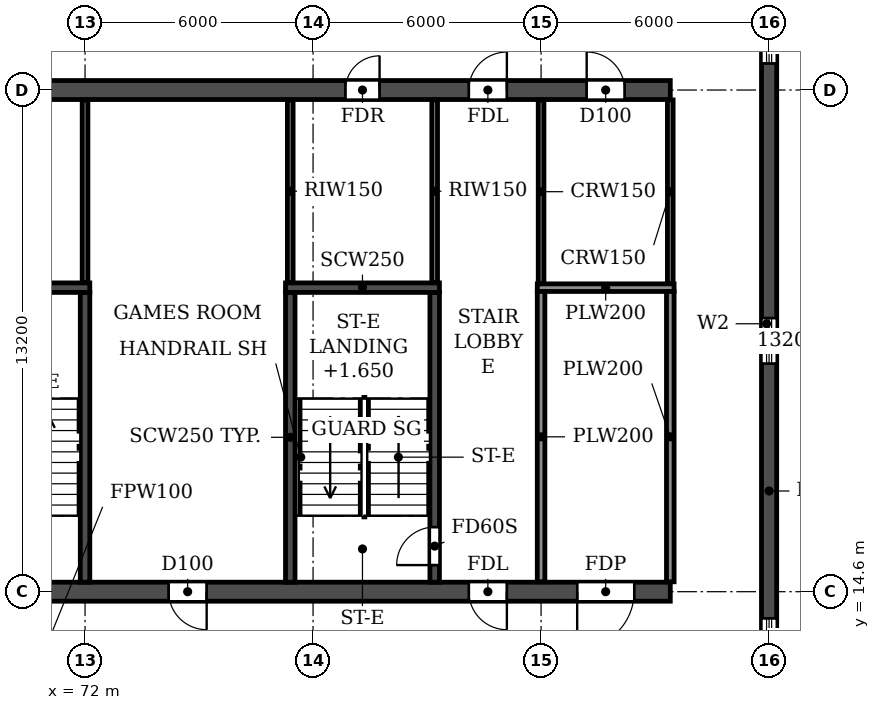
"""IFC4 building model, lengths in metres.
Left out: names, types, materials, properties, quantities, classifications, styles, units other than length and angle.
Written with IfcOpenShell. Run it as: python <this file> out.ifc"""

import sys

from ifc_helpers import new_model, si_unit, direction, frame, frame_2d, origin, place, context, subcontext, project, spatial, rectangle, extrude, element, fill, save


model = new_model("IFC4")
c1 = context("Model", 3, precision=1e-05, world=origin(), true_north=direction((0.0, 1.0)))
c2 = subcontext(c1, "Body", "Model", "MODEL_VIEW")
j1 = project(units=[si_unit("LENGTHUNIT", "METRE"), si_unit("PLANEANGLEUNIT", "RADIAN")], contexts=[c1])
p1 = place(None, origin())
s1 = spatial("IfcSite", under=j1, at=p1, CompositionType="ELEMENT")
p2 = place(p1, origin())
s2 = spatial("IfcBuilding", under=s1, at=p2, CompositionType="ELEMENT")
p3 = place(p2, frame((0.0, 0.0, 112.5)))
s3 = spatial("IfcBuildingStorey", under=s2, at=p3, CompositionType="ELEMENT", Elevation=112.5)
p4 = place(p3, frame((90.0, 4.683, 0.0), z_axis=(0.0, 0.0, 1.0), x_axis=(0.0, 1.0, 0.0)))
e1 = element("IfcWall", 1, at=p4, inside=s3, PredefinedType="SHEAR", context=c2, shape_type="SweptSolid", body=[
    extrude(rectangle(XDim=34.234, YDim=0.4, at=frame_2d((17.117, 0.0))), origin(), (0.0, 0.0, 1.0), 2.95),
])
p5 = place(p4, frame((15.917, 0.0, 0.9)))
e2 = element("IfcOpeningElement", 2, at=p5, cuts=e1, PredefinedType="OPENING", context=c2, shape_type="SweptSolid", body=[
    extrude(rectangle(XDim=1.2, YDim=1.5, at=frame_2d((0.6, 0.75))), frame((0.0, 0.21, 0.0), z_axis=(0.0, -1.0, 0.0), x_axis=(1.0, 0.0, 0.0)), (0.0, 0.0, 1.0), 0.42),
])
p6 = place(p4, frame((23.817, 0.0, 0.9)))
e3 = element("IfcOpeningElement", 3, at=p6, cuts=e1, PredefinedType="OPENING", context=c2, shape_type="SweptSolid", body=[
    extrude(rectangle(XDim=1.2, YDim=1.5, at=frame_2d((0.6, 0.75))), frame((0.0, 0.21, 0.0), z_axis=(0.0, -1.0, 0.0), x_axis=(1.0, 0.0, 0.0)), (0.0, 0.0, 1.0), 0.42),
])
p7 = place(p4, frame((8.017, 0.0, 0.9)))
e4 = element("IfcOpeningElement", 4, at=p7, cuts=e1, PredefinedType="OPENING", context=c2, shape_type="SweptSolid", body=[
    extrude(rectangle(XDim=1.2, YDim=1.5, at=frame_2d((0.6, 0.75))), frame((0.0, 0.21, 0.0), z_axis=(0.0, -1.0, 0.0), x_axis=(1.0, 0.0, 0.0)), (0.0, 0.0, 1.0), 0.42),
])
p8 = place(p4, frame((28.894, 0.0, 0.6)))
e5 = element("IfcOpeningElement", 5, at=p8, cuts=e1, PredefinedType="OPENING", context=c2, shape_type="SweptSolid", body=[
    extrude(rectangle(XDim=2.2, YDim=1.8, at=frame_2d((1.1, 0.9))), frame((0.0, 0.21, 0.0), z_axis=(0.0, -1.0, 0.0), x_axis=(1.0, 0.0, 0.0)), (0.0, 0.0, 1.0), 0.42),
])
p9 = place(p4, frame((2.541, 0.0, 0.6)))
e6 = element("IfcOpeningElement", 6, at=p9, cuts=e1, PredefinedType="OPENING", context=c2, shape_type="SweptSolid", body=[
    extrude(rectangle(XDim=2.2, YDim=1.8, at=frame_2d((1.1, 0.9))), frame((0.0, 0.21, 0.0), z_axis=(0.0, -1.0, 0.0), x_axis=(1.0, 0.0, 0.0)), (0.0, 0.0, 1.0), 0.42),
])
p10 = place(p3, frame((14.6, 14.6, 0.0), z_axis=(0.0, 0.0, 1.0), x_axis=(1.0, 0.0, 0.0)))
e7 = element("IfcWall", 7, at=p10, inside=s3, PredefinedType="SOLIDWALL", context=c2, shape_type="SweptSolid", body=[
    extrude(rectangle(XDim=72.8, YDim=0.5, at=frame_2d((36.4, 0.0))), origin(), (0.0, 0.0, 1.0), 2.95),
])
p11 = place(p10, frame((1.2, 0.0, 0.0)))
e8 = element("IfcOpeningElement", 8, at=p11, cuts=e7, PredefinedType="OPENING", context=c2, shape_type="SweptSolid", body=[
    extrude(rectangle(XDim=1.0, YDim=2.1, at=frame_2d((0.5, 1.05))), frame((0.0, 0.26, 0.0), z_axis=(0.0, -1.0, 0.0), x_axis=(1.0, 0.0, 0.0)), (0.0, 0.0, 1.0), 0.52),
])
p12 = place(p10, frame((4.3, 0.0, 0.0)))
e9 = element("IfcOpeningElement", 9, at=p12, cuts=e7, PredefinedType="OPENING", context=c2, shape_type="SweptSolid", body=[
    extrude(rectangle(XDim=1.0, YDim=2.1, at=frame_2d((0.5, 1.05))), frame((0.0, 0.26, 0.0), z_axis=(0.0, -1.0, 0.0), x_axis=(1.0, 0.0, 0.0)), (0.0, 0.0, 1.0), 0.52),
])
p13 = place(p10, frame((12.2, 0.0, 0.0)))
e10 = element("IfcOpeningElement", 10, at=p13, cuts=e7, PredefinedType="OPENING", context=c2, shape_type="SweptSolid", body=[
    extrude(rectangle(XDim=1.0, YDim=2.1, at=frame_2d((0.5, 1.05))), frame((0.0, 0.26, 0.0), z_axis=(0.0, -1.0, 0.0), x_axis=(1.0, 0.0, 0.0)), (0.0, 0.0, 1.0), 0.52),
])
p14 = place(p10, frame((16.8, 0.0, 0.0)))
e11 = element("IfcOpeningElement", 11, at=p14, cuts=e7, PredefinedType="OPENING", context=c2, shape_type="SweptSolid", body=[
    extrude(rectangle(XDim=1.0, YDim=2.1, at=frame_2d((0.5, 1.05))), frame((0.0, 0.26, 0.0), z_axis=(0.0, -1.0, 0.0), x_axis=(1.0, 0.0, 0.0)), (0.0, 0.0, 1.0), 0.52),
])
p15 = place(p10, frame((28.1, 0.0, 0.0)))
e12 = element("IfcOpeningElement", 12, at=p15, cuts=e7, PredefinedType="OPENING", context=c2, shape_type="SweptSolid", body=[
    extrude(rectangle(XDim=1.0, YDim=2.1, at=frame_2d((0.5, 1.05))), frame((0.0, 0.26, 0.0), z_axis=(0.0, -1.0, 0.0), x_axis=(1.0, 0.0, 0.0)), (0.0, 0.0, 1.0), 0.52),
])
p16 = place(p10, frame((32.0, 0.0, 0.0)))
e13 = element("IfcOpeningElement", 13, at=p16, cuts=e7, PredefinedType="OPENING", context=c2, shape_type="SweptSolid", body=[
    extrude(rectangle(XDim=1.0, YDim=2.1, at=frame_2d((0.5, 1.05))), frame((0.0, 0.26, 0.0), z_axis=(0.0, -1.0, 0.0), x_axis=(1.0, 0.0, 0.0)), (0.0, 0.0, 1.0), 0.52),
])
p17 = place(p10, frame((35.9, 0.0, 0.0)))
e14 = element("IfcOpeningElement", 14, at=p17, cuts=e7, PredefinedType="OPENING", context=c2, shape_type="SweptSolid", body=[
    extrude(rectangle(XDim=1.0, YDim=2.1, at=frame_2d((0.5, 1.05))), frame((0.0, 0.26, 0.0), z_axis=(0.0, -1.0, 0.0), x_axis=(1.0, 0.0, 0.0)), (0.0, 0.0, 1.0), 0.52),
])
p18 = place(p10, frame((39.8, 0.0, 0.0)))
e15 = element("IfcOpeningElement", 15, at=p18, cuts=e7, PredefinedType="OPENING", context=c2, shape_type="SweptSolid", body=[
    extrude(rectangle(XDim=1.0, YDim=2.1, at=frame_2d((0.5, 1.05))), frame((0.0, 0.26, 0.0), z_axis=(0.0, -1.0, 0.0), x_axis=(1.0, 0.0, 0.0)), (0.0, 0.0, 1.0), 0.52),
])
p19 = place(p10, frame((43.7, 0.0, 0.0)))
e16 = element("IfcOpeningElement", 16, at=p19, cuts=e7, PredefinedType="OPENING", context=c2, shape_type="SweptSolid", body=[
    extrude(rectangle(XDim=1.0, YDim=2.1, at=frame_2d((0.5, 1.05))), frame((0.0, 0.26, 0.0), z_axis=(0.0, -1.0, 0.0), x_axis=(1.0, 0.0, 0.0)), (0.0, 0.0, 1.0), 0.52),
])
p20 = place(p10, frame((55.0, 0.0, 0.0)))
e17 = element("IfcOpeningElement", 17, at=p20, cuts=e7, PredefinedType="OPENING", context=c2, shape_type="SweptSolid", body=[
    extrude(rectangle(XDim=1.0, YDim=2.1, at=frame_2d((0.5, 1.05))), frame((0.0, 0.26, 0.0), z_axis=(0.0, -1.0, 0.0), x_axis=(1.0, 0.0, 0.0)), (0.0, 0.0, 1.0), 0.52),
])
p21 = place(p10, frame((59.6, 0.0, 0.0)))
e18 = element("IfcOpeningElement", 18, at=p21, cuts=e7, PredefinedType="OPENING", context=c2, shape_type="SweptSolid", body=[
    extrude(rectangle(XDim=1.0, YDim=2.1, at=frame_2d((0.5, 1.05))), frame((0.0, 0.26, 0.0), z_axis=(0.0, -1.0, 0.0), x_axis=(1.0, 0.0, 0.0)), (0.0, 0.0, 1.0), 0.52),
])
p22 = place(p10, frame((67.5, 0.0, 0.0)))
e19 = element("IfcOpeningElement", 19, at=p22, cuts=e7, PredefinedType="OPENING", context=c2, shape_type="SweptSolid", body=[
    extrude(rectangle(XDim=1.0, YDim=2.1, at=frame_2d((0.5, 1.05))), frame((0.0, 0.26, 0.0), z_axis=(0.0, -1.0, 0.0), x_axis=(1.0, 0.0, 0.0)), (0.0, 0.0, 1.0), 0.52),
])
p23 = place(p10, frame((70.35, 0.0, 0.0)))
e20 = element("IfcOpeningElement", 20, at=p23, cuts=e7, PredefinedType="OPENING", context=c2, shape_type="SweptSolid", body=[
    extrude(rectangle(XDim=1.5, YDim=2.1, at=frame_2d((0.75, 1.05))), frame((0.0, 0.26, 0.0), z_axis=(0.0, -1.0, 0.0), x_axis=(1.0, 0.0, 0.0)), (0.0, 0.0, 1.0), 0.52),
])
p24 = place(p3, frame((14.6, 27.8, 0.0), z_axis=(0.0, 0.0, 1.0), x_axis=(1.0, 0.0, 0.0)))
e21 = element("IfcWall", 21, at=p24, inside=s3, PredefinedType="SOLIDWALL", context=c2, shape_type="SweptSolid", body=[
    extrude(rectangle(XDim=72.8, YDim=0.5, at=frame_2d((36.4, 0.0))), origin(), (0.0, 0.0, 1.0), 2.95),
])
p25 = place(p24, frame((1.2, 0.0, 0.0)))
e22 = element("IfcOpeningElement", 22, at=p25, cuts=e21, PredefinedType="OPENING", context=c2, shape_type="SweptSolid", body=[
    extrude(rectangle(XDim=1.0, YDim=2.1, at=frame_2d((0.5, 1.05))), frame((0.0, 0.26, 0.0), z_axis=(0.0, -1.0, 0.0), x_axis=(1.0, 0.0, 0.0)), (0.0, 0.0, 1.0), 0.52),
])
p26 = place(p24, frame((4.3, 0.0, 0.0)))
e23 = element("IfcOpeningElement", 23, at=p26, cuts=e21, PredefinedType="OPENING", context=c2, shape_type="SweptSolid", body=[
    extrude(rectangle(XDim=1.0, YDim=2.1, at=frame_2d((0.5, 1.05))), frame((0.0, 0.26, 0.0), z_axis=(0.0, -1.0, 0.0), x_axis=(1.0, 0.0, 0.0)), (0.0, 0.0, 1.0), 0.52),
])
p27 = place(p24, frame((7.65, 0.0, 0.0)))
e24 = element("IfcOpeningElement", 24, at=p27, cuts=e21, PredefinedType="OPENING", context=c2, shape_type="SweptSolid", body=[
    extrude(rectangle(XDim=0.9, YDim=2.1, at=frame_2d((0.45, 1.05))), frame((0.0, 0.26, 0.0), z_axis=(0.0, -1.0, 0.0), x_axis=(1.0, 0.0, 0.0)), (0.0, 0.0, 1.0), 0.52),
])
p28 = place(p24, frame((16.85, 0.0, 0.0)))
e25 = element("IfcOpeningElement", 25, at=p28, cuts=e21, PredefinedType="OPENING", context=c2, shape_type="SweptSolid", body=[
    extrude(rectangle(XDim=0.9, YDim=2.1, at=frame_2d((0.45, 1.05))), frame((0.0, 0.26, 0.0), z_axis=(0.0, -1.0, 0.0), x_axis=(1.0, 0.0, 0.0)), (0.0, 0.0, 1.0), 0.52),
])
p29 = place(p24, frame((20.0, 0.0, 0.0)))
e26 = element("IfcOpeningElement", 26, at=p29, cuts=e21, PredefinedType="OPENING", context=c2, shape_type="SweptSolid", body=[
    extrude(rectangle(XDim=1.0, YDim=2.1, at=frame_2d((0.5, 1.05))), frame((0.0, 0.26, 0.0), z_axis=(0.0, -1.0, 0.0), x_axis=(1.0, 0.0, 0.0)), (0.0, 0.0, 1.0), 0.52),
])
p30 = place(p24, frame((25.2, 0.0, 0.0)))
e27 = element("IfcOpeningElement", 27, at=p30, cuts=e21, PredefinedType="OPENING", context=c2, shape_type="SweptSolid", body=[
    extrude(rectangle(XDim=1.0, YDim=2.1, at=frame_2d((0.5, 1.05))), frame((0.0, 0.26, 0.0), z_axis=(0.0, -1.0, 0.0), x_axis=(1.0, 0.0, 0.0)), (0.0, 0.0, 1.0), 0.52),
])
p31 = place(p24, frame((33.0, 0.0, 0.0)))
e28 = element("IfcOpeningElement", 28, at=p31, cuts=e21, PredefinedType="OPENING", context=c2, shape_type="SweptSolid", body=[
    extrude(rectangle(XDim=1.0, YDim=2.1, at=frame_2d((0.5, 1.05))), frame((0.0, 0.26, 0.0), z_axis=(0.0, -1.0, 0.0), x_axis=(1.0, 0.0, 0.0)), (0.0, 0.0, 1.0), 0.52),
])
p32 = place(p24, frame((35.9, 0.0, 0.0)))
e29 = element("IfcOpeningElement", 29, at=p32, cuts=e21, PredefinedType="OPENING", context=c2, shape_type="SweptSolid", body=[
    extrude(rectangle(XDim=1.0, YDim=2.1, at=frame_2d((0.5, 1.05))), frame((0.0, 0.26, 0.0), z_axis=(0.0, -1.0, 0.0), x_axis=(1.0, 0.0, 0.0)), (0.0, 0.0, 1.0), 0.52),
])
p33 = place(p24, frame((38.8, 0.0, 0.0)))
e30 = element("IfcOpeningElement", 30, at=p33, cuts=e21, PredefinedType="OPENING", context=c2, shape_type="SweptSolid", body=[
    extrude(rectangle(XDim=1.0, YDim=2.1, at=frame_2d((0.5, 1.05))), frame((0.0, 0.26, 0.0), z_axis=(0.0, -1.0, 0.0), x_axis=(1.0, 0.0, 0.0)), (0.0, 0.0, 1.0), 0.52),
])
p34 = place(p24, frame((44.0, 0.0, 0.0)))
e31 = element("IfcOpeningElement", 31, at=p34, cuts=e21, PredefinedType="OPENING", context=c2, shape_type="SweptSolid", body=[
    extrude(rectangle(XDim=1.0, YDim=2.1, at=frame_2d((0.5, 1.05))), frame((0.0, 0.26, 0.0), z_axis=(0.0, -1.0, 0.0), x_axis=(1.0, 0.0, 0.0)), (0.0, 0.0, 1.0), 0.52),
])
p35 = place(p24, frame((49.2, 0.0, 0.0)))
e32 = element("IfcOpeningElement", 32, at=p35, cuts=e21, PredefinedType="OPENING", context=c2, shape_type="SweptSolid", body=[
    extrude(rectangle(XDim=1.0, YDim=2.1, at=frame_2d((0.5, 1.05))), frame((0.0, 0.26, 0.0), z_axis=(0.0, -1.0, 0.0), x_axis=(1.0, 0.0, 0.0)), (0.0, 0.0, 1.0), 0.52),
])
p36 = place(p24, frame((51.8, 0.0, 0.0)))
e33 = element("IfcOpeningElement", 33, at=p36, cuts=e21, PredefinedType="OPENING", context=c2, shape_type="SweptSolid", body=[
    extrude(rectangle(XDim=1.0, YDim=2.1, at=frame_2d((0.5, 1.05))), frame((0.0, 0.26, 0.0), z_axis=(0.0, -1.0, 0.0), x_axis=(1.0, 0.0, 0.0)), (0.0, 0.0, 1.0), 0.52),
])
p37 = place(p24, frame((55.05, 0.0, 0.0)))
e34 = element("IfcOpeningElement", 34, at=p37, cuts=e21, PredefinedType="OPENING", context=c2, shape_type="SweptSolid", body=[
    extrude(rectangle(XDim=0.9, YDim=2.1, at=frame_2d((0.45, 1.05))), frame((0.0, 0.26, 0.0), z_axis=(0.0, -1.0, 0.0), x_axis=(1.0, 0.0, 0.0)), (0.0, 0.0, 1.0), 0.52),
])
p38 = place(p24, frame((64.25, 0.0, 0.0)))
e35 = element("IfcOpeningElement", 35, at=p38, cuts=e21, PredefinedType="OPENING", context=c2, shape_type="SweptSolid", body=[
    extrude(rectangle(XDim=0.9, YDim=2.1, at=frame_2d((0.45, 1.05))), frame((0.0, 0.26, 0.0), z_axis=(0.0, -1.0, 0.0), x_axis=(1.0, 0.0, 0.0)), (0.0, 0.0, 1.0), 0.52),
])
p39 = place(p24, frame((67.5, 0.0, 0.0)))
e36 = element("IfcOpeningElement", 36, at=p39, cuts=e21, PredefinedType="OPENING", context=c2, shape_type="SweptSolid", body=[
    extrude(rectangle(XDim=1.0, YDim=2.1, at=frame_2d((0.5, 1.05))), frame((0.0, 0.26, 0.0), z_axis=(0.0, -1.0, 0.0), x_axis=(1.0, 0.0, 0.0)), (0.0, 0.0, 1.0), 0.52),
])
p40 = place(p24, frame((70.6, 0.0, 0.0)))
e37 = element("IfcOpeningElement", 37, at=p40, cuts=e21, PredefinedType="OPENING", context=c2, shape_type="SweptSolid", body=[
    extrude(rectangle(XDim=1.0, YDim=2.1, at=frame_2d((0.5, 1.05))), frame((0.0, 0.26, 0.0), z_axis=(0.0, -1.0, 0.0), x_axis=(1.0, 0.0, 0.0)), (0.0, 0.0, 1.0), 0.52),
])
p41 = place(p3, frame((72.0, 14.85, 0.0), z_axis=(0.0, 0.0, 1.0), x_axis=(0.0, 1.0, 0.0)))
e38 = element("IfcWall", 38, at=p41, inside=s3, PredefinedType="SOLIDWALL", context=c2, shape_type="SweptSolid", body=[
    extrude(rectangle(XDim=7.625, YDim=0.25, at=frame_2d((3.812, 0.0))), origin(), (0.0, 0.0, 1.0), 2.95),
])
p42 = place(p3, frame((68.075, 22.6, 0.0), z_axis=(0.0, 0.0, 1.0), x_axis=(1.0, 0.0, 0.0)))
e39 = element("IfcWall", 39, at=p42, inside=s3, PredefinedType="SOLIDWALL", context=c2, shape_type="SweptSolid", body=[
    extrude(rectangle(XDim=4.05, YDim=0.25, at=frame_2d((2.025, 0.0))), origin(), (0.0, 0.0, 1.0), 2.95),
])
p43 = place(p3, frame((77.4, 14.85, 0.0), z_axis=(0.0, 0.0, 1.0), x_axis=(0.0, 1.0, 0.0)))
e40 = element("IfcWall", 40, at=p43, inside=s3, PredefinedType="SOLIDWALL", context=c2, shape_type="SweptSolid", body=[
    extrude(rectangle(XDim=7.625, YDim=0.25, at=frame_2d((3.812, 0.0))), origin(), (0.0, 0.0, 1.0), 2.95),
])
p44 = place(p3, frame((81.2, 14.85, 0.0), z_axis=(0.0, 0.0, 1.0), x_axis=(0.0, 1.0, 0.0)))
e41 = element("IfcWall", 41, at=p44, inside=s3, PredefinedType="SOLIDWALL", context=c2, shape_type="SweptSolid", body=[
    extrude(rectangle(XDim=7.625, YDim=0.25, at=frame_2d((3.812, 0.0))), origin(), (0.0, 0.0, 1.0), 2.95),
])
p45 = place(p44, frame((0.45, 0.0, 0.0)))
e42 = element("IfcOpeningElement", 42, at=p45, cuts=e41, PredefinedType="OPENING", context=c2, shape_type="SweptSolid", body=[
    extrude(rectangle(XDim=1.0, YDim=2.1, at=frame_2d((0.5, 1.05))), frame((0.0, 0.135, 0.0), z_axis=(0.0, -1.0, 0.0), x_axis=(1.0, 0.0, 0.0)), (0.0, 0.0, 1.0), 0.27),
])
p46 = place(p3, frame((77.275, 22.6, 0.0), z_axis=(0.0, 0.0, 1.0), x_axis=(1.0, 0.0, 0.0)))
e43 = element("IfcWall", 43, at=p46, inside=s3, PredefinedType="SOLIDWALL", context=c2, shape_type="SweptSolid", body=[
    extrude(rectangle(XDim=4.05, YDim=0.25, at=frame_2d((2.025, 0.0))), origin(), (0.0, 0.0, 1.0), 2.95),
])
for number, where, z_axis, x_axis in (
    (44, (84.0, 22.7, 0.0), (0.0, 0.0, 1.0), (0.0, 1.0, 0.0)),
    (45, (87.4, 22.7, 0.0), (0.0, 0.0, 1.0), (0.0, 1.0, 0.0)),
):
    element("IfcWall", number, at=place(p3, frame(where, z_axis=z_axis, x_axis=x_axis)), inside=s3, PredefinedType="PARTITIONING", context=c2, shape_type="SweptSolid", body=[
        extrude(rectangle(XDim=4.84, YDim=0.15, at=frame_2d((2.42, 0.0))), origin(), (0.0, 0.0, 1.0), 2.95),
    ])
p47 = place(p3, frame((83.9, 22.6, 0.0), z_axis=(0.0, 0.0, 1.0), x_axis=(1.0, 0.0, 0.0)))
e46 = element("IfcWall", 46, at=p47, inside=s3, PredefinedType="PARTITIONING", context=c2, shape_type="SweptSolid", body=[
    extrude(rectangle(XDim=3.6, YDim=0.2, at=frame_2d((1.8, 0.0))), origin(), (0.0, 0.0, 1.0), 2.95),
])
for number, where, z_axis, x_axis in (
    (47, (84.0, 14.86, 0.0), (0.0, 0.0, 1.0), (0.0, 1.0, 0.0)),
    (48, (87.4, 14.86, 0.0), (0.0, 0.0, 1.0), (0.0, 1.0, 0.0)),
):
    element("IfcWall", number, at=place(p3, frame(where, z_axis=z_axis, x_axis=x_axis)), inside=s3, PredefinedType="PARTITIONING", context=c2, shape_type="SweptSolid", body=[
        extrude(rectangle(XDim=7.64, YDim=0.2, at=frame_2d((3.82, 0.0))), origin(), (0.0, 0.0, 1.0), 2.95),
    ])
for number, where, z_axis, x_axis in (
    (49, (72.0, 22.735, 0.0), (0.0, 0.0, 1.0), (0.0, 1.0, 0.0)),
    (50, (77.4, 22.735, 0.0), (0.0, 0.0, 1.0), (0.0, 1.0, 0.0)),
    (51, (81.2, 22.735, 0.0), (0.0, 0.0, 1.0), (0.0, 1.0, 0.0)),
):
    element("IfcWall", number, at=place(p3, frame(where, z_axis=z_axis, x_axis=x_axis)), inside=s3, PredefinedType="PARTITIONING", context=c2, shape_type="SweptSolid", body=[
        extrude(rectangle(XDim=4.805, YDim=0.15, at=frame_2d((2.402, 0.0))), origin(), (0.0, 0.0, 1.0), 2.95),
    ])
p48 = place(p5, origin())
e52 = element("IfcWindow", 52, at=p48, inside=s3, PartitioningType="SINGLE_PANEL", PredefinedType="WINDOW", context=c2, shape_type="SweptSolid", body=[
    extrude(rectangle(XDim=1.2, YDim=1.5, at=frame_2d((0.6, 0.75))), frame((0.0, 0.03, 0.0), z_axis=(0.0, -1.0, 0.0), x_axis=(1.0, 0.0, 0.0)), (0.0, 0.0, 1.0), 0.06),
])
fill(e2, e52)
p49 = place(p6, origin())
e53 = element("IfcWindow", 53, at=p49, inside=s3, PartitioningType="SINGLE_PANEL", PredefinedType="WINDOW", context=c2, shape_type="SweptSolid", body=[
    extrude(rectangle(XDim=1.2, YDim=1.5, at=frame_2d((0.6, 0.75))), frame((0.0, 0.03, 0.0), z_axis=(0.0, -1.0, 0.0), x_axis=(1.0, 0.0, 0.0)), (0.0, 0.0, 1.0), 0.06),
])
fill(e3, e53)
p50 = place(p7, origin())
e54 = element("IfcWindow", 54, at=p50, inside=s3, PartitioningType="SINGLE_PANEL", PredefinedType="WINDOW", context=c2, shape_type="SweptSolid", body=[
    extrude(rectangle(XDim=1.2, YDim=1.5, at=frame_2d((0.6, 0.75))), frame((0.0, 0.03, 0.0), z_axis=(0.0, -1.0, 0.0), x_axis=(1.0, 0.0, 0.0)), (0.0, 0.0, 1.0), 0.06),
])
fill(e4, e54)
p51 = place(p38, origin())
e55 = element("IfcDoor", 55, at=p51, inside=s3, OperationType="SINGLE_SWING_RIGHT", PredefinedType="DOOR", context=c2, shape_type="SweptSolid", body=[
    extrude(rectangle(XDim=0.9, YDim=2.1, at=frame_2d((0.45, 1.05))), frame((0.0, 0.025, 0.0), z_axis=(0.0, -1.0, 0.0), x_axis=(1.0, 0.0, 0.0)), (0.0, 0.0, 1.0), 0.05),
])
fill(e35, e55)
p52 = place(p39, origin())
e56 = element("IfcDoor", 56, at=p52, inside=s3, OperationType="SINGLE_SWING_RIGHT", PredefinedType="DOOR", context=c2, shape_type="SweptSolid", body=[
    extrude(rectangle(XDim=1.0, YDim=2.1, at=frame_2d((0.5, 1.05))), frame((0.0, 0.025, 0.0), z_axis=(0.0, -1.0, 0.0), x_axis=(1.0, 0.0, 0.0)), (0.0, 0.0, 1.0), 0.05),
])
fill(e36, e56)
p53 = place(p40, origin())
e57 = element("IfcDoor", 57, at=p53, inside=s3, OperationType="SINGLE_SWING_LEFT", PredefinedType="DOOR", context=c2, shape_type="SweptSolid", body=[
    extrude(rectangle(XDim=1.0, YDim=2.1, at=frame_2d((0.5, 1.05))), frame((0.0, 0.025, 0.0), z_axis=(0.0, -1.0, 0.0), x_axis=(1.0, 0.0, 0.0)), (0.0, 0.0, 1.0), 0.05),
])
fill(e37, e57)
p54 = place(p21, frame((1.0, 0.0, 0.0), z_axis=(0.0, 0.0, 1.0), x_axis=(-1.0, 0.0, 0.0)))
e58 = element("IfcDoor", 58, at=p54, inside=s3, OperationType="SINGLE_SWING_LEFT", PredefinedType="DOOR", context=c2, shape_type="SweptSolid", body=[
    extrude(rectangle(XDim=1.0, YDim=2.1, at=frame_2d((0.5, 1.05))), frame((0.0, 0.025, 0.0), z_axis=(0.0, -1.0, 0.0), x_axis=(1.0, 0.0, 0.0)), (0.0, 0.0, 1.0), 0.05),
])
fill(e18, e58)
p55 = place(p22, frame((1.0, 0.0, 0.0), z_axis=(0.0, 0.0, 1.0), x_axis=(-1.0, 0.0, 0.0)))
e59 = element("IfcDoor", 59, at=p55, inside=s3, OperationType="SINGLE_SWING_LEFT", PredefinedType="DOOR", context=c2, shape_type="SweptSolid", body=[
    extrude(rectangle(XDim=1.0, YDim=2.1, at=frame_2d((0.5, 1.05))), frame((0.0, 0.025, 0.0), z_axis=(0.0, -1.0, 0.0), x_axis=(1.0, 0.0, 0.0)), (0.0, 0.0, 1.0), 0.05),
])
fill(e19, e59)
p56 = place(p23, frame((1.5, 0.0, 0.0), z_axis=(0.0, 0.0, 1.0), x_axis=(-1.0, 0.0, 0.0)))
e60 = element("IfcDoor", 60, at=p56, inside=s3, OperationType="DOUBLE_DOOR_SINGLE_SWING", PredefinedType="DOOR", context=c2, shape_type="SweptSolid", body=[
    extrude(rectangle(XDim=1.5, YDim=2.1, at=frame_2d((0.75, 1.05))), frame((0.0, 0.025, 0.0), z_axis=(0.0, -1.0, 0.0), x_axis=(1.0, 0.0, 0.0)), (0.0, 0.0, 1.0), 0.05),
])
fill(e20, e60)
p57 = place(p45, origin())
e61 = element("IfcDoor", 61, at=p57, inside=s3, OperationType="SINGLE_SWING_LEFT", PredefinedType="DOOR", context=c2, shape_type="SweptSolid", body=[
    extrude(rectangle(XDim=1.0, YDim=2.1, at=frame_2d((0.5, 1.05))), frame((0.0, 0.025, 0.0), z_axis=(0.0, -1.0, 0.0), x_axis=(1.0, 0.0, 0.0)), (0.0, 0.0, 1.0), 0.05),
])
fill(e42, e61)
save(model, sys.argv[1])
